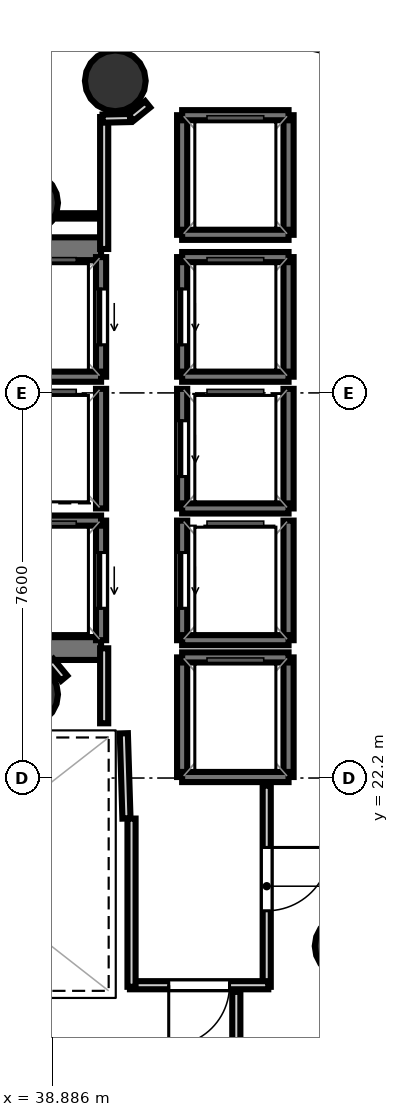
"""IFC4 building model, lengths in metres.
Left out: names, types, materials, properties, quantities, classifications, styles, units other than length and angle.
Written with IfcOpenShell. Run it as: python <this file> out.ifc"""

import sys

from ifc_helpers import new_model, si_unit, direction, frame, frame_2d, origin, origin_2d, place, context, subcontext, project, spatial, rectangle, hollow_circle, extrude, element, fill, save


model = new_model("IFC4")
c1 = context("Model", 3, precision=1e-05, world=origin(), true_north=direction((0.0, 1.0)))
c2 = subcontext(c1, "Body", "Model", "MODEL_VIEW")
j1 = project(units=[si_unit("LENGTHUNIT", "METRE"), si_unit("PLANEANGLEUNIT", "RADIAN")], contexts=[c1])
p1 = place(None, origin())
s1 = spatial("IfcSite", under=j1, at=p1, CompositionType="ELEMENT")
p2 = place(p1, origin())
s2 = spatial("IfcBuilding", under=s1, at=p2, CompositionType="ELEMENT")
p3 = place(p2, frame((0.0, 0.0, 204.0)))
s3 = spatial("IfcBuildingStorey", under=s2, at=p3, CompositionType="ELEMENT", Elevation=204.0)
p4 = place(p3, frame((29.33, 32.645, 0.0), z_axis=(0.0, 0.0, 1.0), x_axis=(1.0, 0.0, 0.0)))
e1 = element("IfcWall", 1, at=p4, inside=s3, PredefinedType="SHEAR", context=c2, shape_type="SweptSolid", body=[
    extrude(rectangle(XDim=10.52, YDim=0.45, at=frame_2d((5.26, 0.0))), origin(), (0.0, 0.0, 1.0), 3.52),
])
p5 = place(p4, frame((0.895, 0.0, 0.0)))
e2 = element("IfcOpeningElement", 2, at=p5, cuts=e1, PredefinedType="OPENING", context=c2, shape_type="SweptSolid", body=[
    extrude(rectangle(XDim=1.25, YDim=2.15, at=frame_2d((0.625, 1.075))), frame((0.0, 0.235, 0.0), z_axis=(0.0, -1.0, 0.0), x_axis=(1.0, 0.0, 0.0)), (0.0, 0.0, 1.0), 0.47),
])
p6 = place(p3, frame((29.33, 24.755, 0.0), z_axis=(0.0, 0.0, 1.0), x_axis=(1.0, 0.0, 0.0)))
e3 = element("IfcWall", 3, at=p6, inside=s3, PredefinedType="SHEAR", context=c2, shape_type="SweptSolid", body=[
    extrude(rectangle(XDim=10.52, YDim=0.45, at=frame_2d((5.26, 0.0))), origin(), (0.0, 0.0, 1.0), 3.52),
])
p7 = place(p6, frame((0.695, 0.0, 0.0)))
e4 = element("IfcOpeningElement", 4, at=p7, cuts=e3, PredefinedType="OPENING", context=c2, shape_type="SweptSolid", body=[
    extrude(rectangle(XDim=1.25, YDim=2.15, at=frame_2d((0.625, 1.075))), frame((0.0, 0.235, 0.0), z_axis=(0.0, -1.0, 0.0), x_axis=(1.0, 0.0, 0.0)), (0.0, 0.0, 1.0), 0.47),
])
for number, where, z_axis, x_axis in (
    (5, (38.4, 33.55, 0.0), (0.0, 0.0, 1.0), (1.0, 0.0, 0.0)),
    (6, (38.4, 23.85, 0.0), (0.0, 0.0, 1.0), (1.0, 0.0, 0.0)),
    (7, (40.131, 35.958, 0.0), (0.0, 0.0, 1.0), (1.0, 0.0, 0.0)),
    (8, (44.667, 18.883, 0.0), (0.0, 0.0, 1.0), (1.0, 0.0, 0.0)),
):
    element("IfcColumn", number, at=place(p3, frame(where, z_axis=z_axis, x_axis=x_axis)), inside=s3, PredefinedType="COLUMN", context=c2, shape_type="SweptSolid", body=[
        extrude(hollow_circle(Radius=0.6, WallThickness=0.03, at=origin_2d()), origin(), (0.0, 0.0, 1.0), 3.7),
    ])
p8 = place(p3, frame((39.85, 30.12, 0.0), z_axis=(0.0, 0.0, 1.0), x_axis=(0.0, 1.0, 0.0)))
e9 = element("IfcWall", 9, at=p8, inside=s3, PredefinedType="SOLIDWALL", context=c2, shape_type="SweptSolid", body=[
    extrude(rectangle(XDim=2.36, YDim=0.2, at=frame_2d((1.18, 0.0))), origin(), (0.0, 0.0, 1.0), 3.52),
])
p9 = place(p8, frame((0.63, 0.0, 0.0)))
e10 = element("IfcOpeningElement", 10, at=p9, cuts=e9, PredefinedType="OPENING", context=c2, shape_type="SweptSolid", body=[
    extrude(rectangle(XDim=1.1, YDim=2.15, at=frame_2d((0.55, 1.075))), frame((0.0, 0.11, 0.0), z_axis=(0.0, -1.0, 0.0), x_axis=(1.0, 0.0, 0.0)), (0.0, 0.0, 1.0), 0.22),
])
p10 = place(p3, frame((37.75, 30.12, 0.0), z_axis=(0.0, 0.0, 1.0), x_axis=(1.0, 0.0, 0.0)))
e11 = element("IfcWall", 11, at=p10, inside=s3, PredefinedType="SOLIDWALL", context=c2, shape_type="SweptSolid", body=[
    extrude(rectangle(XDim=2.1, YDim=0.2, at=frame_2d((1.05, 0.0))), origin(), (0.0, 0.0, 1.0), 3.52),
])
p11 = place(p3, frame((39.85, 24.92, 0.0), z_axis=(0.0, 0.0, 1.0), x_axis=(0.0, 1.0, 0.0)))
e12 = element("IfcWall", 12, at=p11, inside=s3, PredefinedType="SOLIDWALL", context=c2, shape_type="SweptSolid", body=[
    extrude(rectangle(XDim=2.36, YDim=0.2, at=frame_2d((1.18, 0.0))), origin(), (0.0, 0.0, 1.0), 3.52),
])
p12 = place(p11, frame((0.63, 0.0, 0.0)))
e13 = element("IfcOpeningElement", 13, at=p12, cuts=e12, PredefinedType="OPENING", context=c2, shape_type="SweptSolid", body=[
    extrude(rectangle(XDim=1.1, YDim=2.15, at=frame_2d((0.55, 1.075))), frame((0.0, 0.11, 0.0), z_axis=(0.0, -1.0, 0.0), x_axis=(1.0, 0.0, 0.0)), (0.0, 0.0, 1.0), 0.22),
])
p13 = place(p3, frame((37.75, 27.28, 0.0), z_axis=(0.0, 0.0, 1.0), x_axis=(1.0, 0.0, 0.0)))
e14 = element("IfcWall", 14, at=p13, inside=s3, PredefinedType="SOLIDWALL", context=c2, shape_type="SweptSolid", body=[
    extrude(rectangle(XDim=2.1, YDim=0.2, at=frame_2d((1.05, 0.0))), origin(), (0.0, 0.0, 1.0), 3.52),
])
p14 = place(p3, frame((43.55, 30.12, 0.0), z_axis=(0.0, 0.0, 1.0), x_axis=(0.0, 1.0, 0.0)))
e15 = element("IfcWall", 15, at=p14, inside=s3, PredefinedType="SOLIDWALL", context=c2, shape_type="SweptSolid", body=[
    extrude(rectangle(XDim=2.36, YDim=0.2, at=frame_2d((1.18, 0.0))), origin(), (0.0, 0.0, 1.0), 3.52),
])
p15 = place(p3, frame((41.45, 30.12, 0.0), z_axis=(0.0, 0.0, 1.0), x_axis=(0.0, 1.0, 0.0)))
e16 = element("IfcWall", 16, at=p15, inside=s3, PredefinedType="SOLIDWALL", context=c2, shape_type="SweptSolid", body=[
    extrude(rectangle(XDim=2.36, YDim=0.2, at=frame_2d((1.18, 0.0))), origin(), (0.0, 0.0, 1.0), 3.52),
])
p16 = place(p15, frame((0.63, 0.0, 0.0)))
e17 = element("IfcOpeningElement", 17, at=p16, cuts=e16, PredefinedType="OPENING", context=c2, shape_type="SweptSolid", body=[
    extrude(rectangle(XDim=1.1, YDim=2.15, at=frame_2d((0.55, 1.075))), frame((0.0, 0.11, 0.0), z_axis=(0.0, -1.0, 0.0), x_axis=(1.0, 0.0, 0.0)), (0.0, 0.0, 1.0), 0.22),
])
for number, where, z_axis, x_axis in (
    (18, (41.45, 32.48, 0.0), (0.0, 0.0, 1.0), (1.0, 0.0, 0.0)),
    (19, (41.45, 30.12, 0.0), (0.0, 0.0, 1.0), (1.0, 0.0, 0.0)),
):
    element("IfcWall", number, at=place(p3, frame(where, z_axis=z_axis, x_axis=x_axis)), inside=s3, PredefinedType="SOLIDWALL", context=c2, shape_type="SweptSolid", body=[
        extrude(rectangle(XDim=2.1, YDim=0.2, at=frame_2d((1.05, 0.0))), origin(), (0.0, 0.0, 1.0), 3.52),
    ])
p17 = place(p3, frame((43.55, 27.52, 0.0), z_axis=(0.0, 0.0, 1.0), x_axis=(0.0, 1.0, 0.0)))
e20 = element("IfcWall", 20, at=p17, inside=s3, PredefinedType="SOLIDWALL", context=c2, shape_type="SweptSolid", body=[
    extrude(rectangle(XDim=2.36, YDim=0.2, at=frame_2d((1.18, 0.0))), origin(), (0.0, 0.0, 1.0), 3.52),
])
p18 = place(p3, frame((41.45, 27.52, 0.0), z_axis=(0.0, 0.0, 1.0), x_axis=(0.0, 1.0, 0.0)))
e21 = element("IfcWall", 21, at=p18, inside=s3, PredefinedType="SOLIDWALL", context=c2, shape_type="SweptSolid", body=[
    extrude(rectangle(XDim=2.36, YDim=0.2, at=frame_2d((1.18, 0.0))), origin(), (0.0, 0.0, 1.0), 3.52),
])
p19 = place(p18, frame((0.63, 0.0, 0.0)))
e22 = element("IfcOpeningElement", 22, at=p19, cuts=e21, PredefinedType="OPENING", context=c2, shape_type="SweptSolid", body=[
    extrude(rectangle(XDim=1.1, YDim=2.15, at=frame_2d((0.55, 1.075))), frame((0.0, 0.11, 0.0), z_axis=(0.0, -1.0, 0.0), x_axis=(1.0, 0.0, 0.0)), (0.0, 0.0, 1.0), 0.22),
])
p20 = place(p3, frame((41.45, 27.52, 0.0), z_axis=(0.0, 0.0, 1.0), x_axis=(1.0, 0.0, 0.0)))
e23 = element("IfcWall", 23, at=p20, inside=s3, PredefinedType="SOLIDWALL", context=c2, shape_type="SweptSolid", body=[
    extrude(rectangle(XDim=2.1, YDim=0.2, at=frame_2d((1.05, 0.0))), origin(), (0.0, 0.0, 1.0), 3.52),
])
p21 = place(p3, frame((43.55, 24.92, 0.0), z_axis=(0.0, 0.0, 1.0), x_axis=(0.0, 1.0, 0.0)))
e24 = element("IfcWall", 24, at=p21, inside=s3, PredefinedType="SOLIDWALL", context=c2, shape_type="SweptSolid", body=[
    extrude(rectangle(XDim=2.36, YDim=0.2, at=frame_2d((1.18, 0.0))), origin(), (0.0, 0.0, 1.0), 3.52),
])
p22 = place(p3, frame((41.45, 24.92, 0.0), z_axis=(0.0, 0.0, 1.0), x_axis=(0.0, 1.0, 0.0)))
e25 = element("IfcWall", 25, at=p22, inside=s3, PredefinedType="SOLIDWALL", context=c2, shape_type="SweptSolid", body=[
    extrude(rectangle(XDim=2.36, YDim=0.2, at=frame_2d((1.18, 0.0))), origin(), (0.0, 0.0, 1.0), 3.52),
])
p23 = place(p22, frame((0.63, 0.0, 0.0)))
e26 = element("IfcOpeningElement", 26, at=p23, cuts=e25, PredefinedType="OPENING", context=c2, shape_type="SweptSolid", body=[
    extrude(rectangle(XDim=1.1, YDim=2.15, at=frame_2d((0.55, 1.075))), frame((0.0, 0.11, 0.0), z_axis=(0.0, -1.0, 0.0), x_axis=(1.0, 0.0, 0.0)), (0.0, 0.0, 1.0), 0.22),
])
p24 = place(p3, frame((41.45, 24.92, 0.0), z_axis=(0.0, 0.0, 1.0), x_axis=(1.0, 0.0, 0.0)))
e27 = element("IfcWall", 27, at=p24, inside=s3, PredefinedType="SOLIDWALL", context=c2, shape_type="SweptSolid", body=[
    extrude(rectangle(XDim=2.1, YDim=0.2, at=frame_2d((1.05, 0.0))), origin(), (0.0, 0.0, 1.0), 3.52),
])
p25 = place(p3, frame((39.85, 27.52, 0.0), z_axis=(0.0, 0.0, 1.0), x_axis=(0.0, 1.0, 0.0)))
e28 = element("IfcWall", 28, at=p25, inside=s3, PredefinedType="SOLIDWALL", context=c2, shape_type="SweptSolid", body=[
    extrude(rectangle(XDim=2.36, YDim=0.2, at=frame_2d((1.18, 0.0))), origin(), (0.0, 0.0, 1.0), 3.52),
])
for number, where, z_axis, x_axis in (
    (29, (43.55, 22.22, 0.0), (0.0, 0.0, 1.0), (0.0, 1.0, 0.0)),
    (30, (41.45, 22.22, 0.0), (0.0, 0.0, 1.0), (0.0, 1.0, 0.0)),
):
    element("IfcWall", number, at=place(p3, frame(where, z_axis=z_axis, x_axis=x_axis)), inside=s3, PredefinedType="SOLIDWALL", context=c2, shape_type="SweptSolid", body=[
        extrude(rectangle(XDim=2.36, YDim=0.2, at=frame_2d((1.18, 0.0))), origin(), (0.0, 0.0, 1.0), 3.52),
    ])
for number, where, z_axis, x_axis in (
    (31, (41.45, 24.58, 0.0), (0.0, 0.0, 1.0), (1.0, 0.0, 0.0)),
    (32, (41.45, 22.22, 0.0), (0.0, 0.0, 1.0), (1.0, 0.0, 0.0)),
):
    element("IfcWall", number, at=place(p3, frame(where, z_axis=z_axis, x_axis=x_axis)), inside=s3, PredefinedType="SOLIDWALL", context=c2, shape_type="SweptSolid", body=[
        extrude(rectangle(XDim=2.1, YDim=0.2, at=frame_2d((1.05, 0.0))), origin(), (0.0, 0.0, 1.0), 3.52),
    ])
for number, where, z_axis, x_axis in (
    (33, (43.55, 32.92, 0.0), (0.0, 0.0, 1.0), (0.0, 1.0, 0.0)),
    (34, (41.45, 32.92, 0.0), (0.0, 0.0, 1.0), (0.0, 1.0, 0.0)),
):
    element("IfcWall", number, at=place(p3, frame(where, z_axis=z_axis, x_axis=x_axis)), inside=s3, PredefinedType="SOLIDWALL", context=c2, shape_type="SweptSolid", body=[
        extrude(rectangle(XDim=2.36, YDim=0.2, at=frame_2d((1.18, 0.0))), origin(), (0.0, 0.0, 1.0), 3.52),
    ])
for number, where, z_axis, x_axis in (
    (35, (41.45, 35.28, 0.0), (0.0, 0.0, 1.0), (1.0, 0.0, 0.0)),
    (36, (41.45, 32.92, 0.0), (0.0, 0.0, 1.0), (1.0, 0.0, 0.0)),
):
    element("IfcWall", number, at=place(p3, frame(where, z_axis=z_axis, x_axis=x_axis)), inside=s3, PredefinedType="SOLIDWALL", context=c2, shape_type="SweptSolid", body=[
        extrude(rectangle(XDim=2.1, YDim=0.2, at=frame_2d((1.05, 0.0))), origin(), (0.0, 0.0, 1.0), 3.52),
    ])
p26 = place(p3, frame((40.351, 21.401, 0.0), z_axis=(0.0, 0.0, 1.0), x_axis=(-0.031058045979, 0.999517582527, 0.0)))
e37 = element("IfcWall", 37, at=p26, inside=s3, PredefinedType="PARTITIONING", context=c2, shape_type="SweptSolid", body=[
    extrude(rectangle(XDim=1.682, YDim=0.16, at=frame_2d((0.841, 0.0))), origin(), (0.0, 0.0, 1.0), 2.84),
])
p27 = place(p3, frame((39.911, 23.28, 0.0), z_axis=(0.0, 0.0, 1.0), x_axis=(0.0, 1.0, 0.0)))
e38 = element("IfcWall", 38, at=p27, inside=s3, PredefinedType="PARTITIONING", context=c2, shape_type="SweptSolid", body=[
    extrude(rectangle(XDim=1.48, YDim=0.16, at=frame_2d((0.74, 0.0))), origin(), (0.0, 0.0, 1.0), 2.84),
])
p28 = place(p3, frame((39.911, 32.64, 0.0), z_axis=(0.0, 0.0, 1.0), x_axis=(0.0, 1.0, 0.0)))
e39 = element("IfcWall", 39, at=p28, inside=s3, PredefinedType="PARTITIONING", context=c2, shape_type="SweptSolid", body=[
    extrude(rectangle(XDim=2.604, YDim=0.16, at=frame_2d((1.302, 0.0))), origin(), (0.0, 0.0, 1.0), 2.84),
])
p29 = place(p3, frame((39.881, 35.213, 0.0), z_axis=(0.0, 0.0, 1.0), x_axis=(0.999756500784, 0.02206669754, 0.0)))
e40 = element("IfcWall", 40, at=p29, inside=s3, PredefinedType="PARTITIONING", context=c2, shape_type="SweptSolid", body=[
    extrude(rectangle(XDim=0.542, YDim=0.16, at=frame_2d((0.271, 0.0))), origin(), (0.0, 0.0, 1.0), 2.84),
])
p30 = place(p3, frame((40.441, 35.232, 0.0), z_axis=(0.0, 0.0, 1.0), x_axis=(0.778714564707, 0.627378376033, 0.0)))
e41 = element("IfcWall", 41, at=p30, inside=s3, PredefinedType="PARTITIONING", context=c2, shape_type="SweptSolid", body=[
    extrude(rectangle(XDim=0.421, YDim=0.16, at=frame_2d((0.21, 0.0))), origin(), (0.0, 0.0, 1.0), 2.84),
])
p31 = place(p3, frame((43.119, 22.05, 0.0), z_axis=(0.0, 0.0, 1.0), x_axis=(0.0, -1.0, 0.0)))
e42 = element("IfcWall", 42, at=p31, inside=s3, PredefinedType="PARTITIONING", context=c2, shape_type="SweptSolid", body=[
    extrude(rectangle(XDim=3.97, YDim=0.16, at=frame_2d((1.985, 0.0))), origin(), (0.0, 0.0, 1.0), 2.84),
])
p32 = place(p31, frame((1.22, 0.0, 0.0)))
e43 = element("IfcOpeningElement", 43, at=p32, cuts=e42, PredefinedType="OPENING", context=c2, shape_type="SweptSolid", body=[
    extrude(rectangle(XDim=1.25, YDim=2.2, at=frame_2d((0.625, 1.1))), frame((0.0, 0.09, 0.0), z_axis=(0.0, -1.0, 0.0), x_axis=(1.0, 0.0, 0.0)), (0.0, 0.0, 1.0), 0.18),
])
p33 = place(p3, frame((43.15, 18.111, 0.0), z_axis=(0.0, 0.0, 1.0), x_axis=(-1.0, 0.0, 0.0)))
e44 = element("IfcWall", 44, at=p33, inside=s3, PredefinedType="PARTITIONING", context=c2, shape_type="SweptSolid", body=[
    extrude(rectangle(XDim=2.73, YDim=0.16, at=frame_2d((1.365, 0.0))), origin(), (0.0, 0.0, 1.0), 2.84),
])
p34 = place(p33, frame((0.765, 0.0, 0.0)))
e45 = element("IfcOpeningElement", 45, at=p34, cuts=e44, PredefinedType="OPENING", context=c2, shape_type="SweptSolid", body=[
    extrude(rectangle(XDim=1.2, YDim=2.15, at=frame_2d((0.6, 1.075))), frame((0.0, 0.09, 0.0), z_axis=(0.0, -1.0, 0.0), x_axis=(1.0, 0.0, 0.0)), (0.0, 0.0, 1.0), 0.18),
])
p35 = place(p3, frame((40.451, 18.08, 0.0), z_axis=(0.0, 0.0, 1.0), x_axis=(0.0, 1.0, 0.0)))
e46 = element("IfcWall", 46, at=p35, inside=s3, PredefinedType="PARTITIONING", context=c2, shape_type="SweptSolid", body=[
    extrude(rectangle(XDim=3.32, YDim=0.16, at=frame_2d((1.66, 0.0))), origin(), (0.0, 0.0, 1.0), 2.84),
])
p36 = place(p3, frame((39.121, 24.17, 0.0), z_axis=(0.0, 0.0, 1.0), x_axis=(-0.638008265708, 0.770029514296, 0.0)))
e47 = element("IfcWall", 47, at=p36, inside=s3, PredefinedType="PARTITIONING", context=c2, shape_type="SweptSolid", body=[
    extrude(rectangle(XDim=0.431, YDim=0.16, at=frame_2d((0.215, 0.0))), origin(), (0.0, 0.0, 1.0), 2.84),
])
p37 = place(p3, frame((42.519, 17.98, 0.0), z_axis=(0.0, 0.0, 1.0), x_axis=(0.0, -1.0, 0.0)))
e48 = element("IfcWall", 48, at=p37, inside=s3, PredefinedType="PARTITIONING", context=c2, shape_type="SweptSolid", body=[
    extrude(rectangle(XDim=2.969, YDim=0.16, at=frame_2d((1.485, 0.0))), origin(), (0.0, 0.0, 1.0), 2.84),
])
p38 = place(p3, frame((39.8, 33.293, 0.0), z_axis=(0.0, 0.0, 1.0), x_axis=(-1.0, 0.0, 0.0)))
e49 = element("IfcWall", 49, at=p38, inside=s3, PredefinedType="PARTITIONING", context=c2, shape_type="SweptSolid", body=[
    extrude(rectangle(XDim=2.87, YDim=0.105, at=frame_2d((1.435, 0.0))), origin(), (0.0, 0.0, 1.0), 2.84),
])
p39 = place(p9, origin())
e50 = element("IfcDoor", 50, at=p39, inside=s3, OperationType="SLIDING_TO_LEFT", PredefinedType="DOOR", context=c2, shape_type="SweptSolid", body=[
    extrude(rectangle(XDim=1.1, YDim=2.15, at=frame_2d((0.55, 1.075))), frame((0.0, 0.025, 0.0), z_axis=(0.0, -1.0, 0.0), x_axis=(1.0, 0.0, 0.0)), (0.0, 0.0, 1.0), 0.05),
])
fill(e10, e50)
p40 = place(p12, origin())
e51 = element("IfcDoor", 51, at=p40, inside=s3, OperationType="SLIDING_TO_LEFT", PredefinedType="DOOR", context=c2, shape_type="SweptSolid", body=[
    extrude(rectangle(XDim=1.1, YDim=2.15, at=frame_2d((0.55, 1.075))), frame((0.0, 0.025, 0.0), z_axis=(0.0, -1.0, 0.0), x_axis=(1.0, 0.0, 0.0)), (0.0, 0.0, 1.0), 0.05),
])
fill(e13, e51)
p41 = place(p16, origin())
e52 = element("IfcDoor", 52, at=p41, inside=s3, OperationType="SLIDING_TO_LEFT", PredefinedType="DOOR", context=c2, shape_type="SweptSolid", body=[
    extrude(rectangle(XDim=1.1, YDim=2.15, at=frame_2d((0.55, 1.075))), frame((0.0, 0.025, 0.0), z_axis=(0.0, -1.0, 0.0), x_axis=(1.0, 0.0, 0.0)), (0.0, 0.0, 1.0), 0.05),
])
fill(e17, e52)
p42 = place(p19, origin())
e53 = element("IfcDoor", 53, at=p42, inside=s3, OperationType="SLIDING_TO_LEFT", PredefinedType="DOOR", context=c2, shape_type="SweptSolid", body=[
    extrude(rectangle(XDim=1.1, YDim=2.15, at=frame_2d((0.55, 1.075))), frame((0.0, 0.025, 0.0), z_axis=(0.0, -1.0, 0.0), x_axis=(1.0, 0.0, 0.0)), (0.0, 0.0, 1.0), 0.05),
])
fill(e22, e53)
p43 = place(p23, origin())
e54 = element("IfcDoor", 54, at=p43, inside=s3, OperationType="SLIDING_TO_LEFT", PredefinedType="DOOR", context=c2, shape_type="SweptSolid", body=[
    extrude(rectangle(XDim=1.1, YDim=2.15, at=frame_2d((0.55, 1.075))), frame((0.0, 0.025, 0.0), z_axis=(0.0, -1.0, 0.0), x_axis=(1.0, 0.0, 0.0)), (0.0, 0.0, 1.0), 0.05),
])
fill(e26, e54)
p44 = place(p34, origin())
e55 = element("IfcDoor", 55, at=p44, inside=s3, OperationType="SINGLE_SWING_RIGHT", PredefinedType="DOOR", context=c2, shape_type="SweptSolid", body=[
    extrude(rectangle(XDim=1.2, YDim=2.15, at=frame_2d((0.6, 1.075))), frame((0.0, 0.025, 0.0), z_axis=(0.0, -1.0, 0.0), x_axis=(1.0, 0.0, 0.0)), (0.0, 0.0, 1.0), 0.05),
])
fill(e45, e55)
p45 = place(p32, origin())
e56 = element("IfcDoor", 56, at=p45, inside=s3, OperationType="SINGLE_SWING_LEFT", PredefinedType="DOOR", context=c2, shape_type="SweptSolid", body=[
    extrude(rectangle(XDim=1.25, YDim=2.2, at=frame_2d((0.625, 1.1))), frame((0.0, 0.025, 0.0), z_axis=(0.0, -1.0, 0.0), x_axis=(1.0, 0.0, 0.0)), (0.0, 0.0, 1.0), 0.05),
])
fill(e43, e56)
save(model, sys.argv[1])
